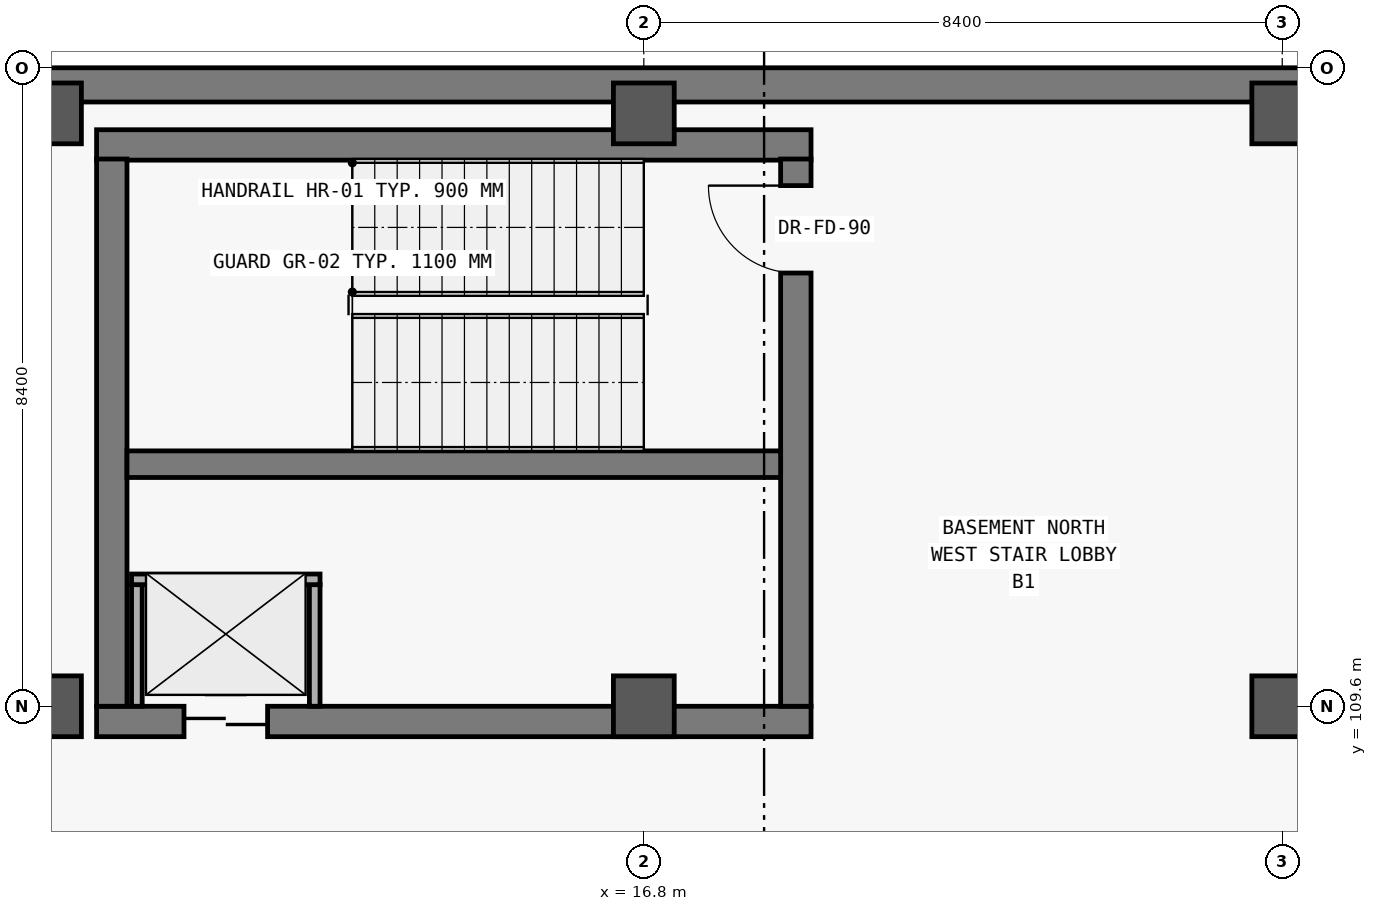
"""IFC4 building model, lengths in metres.
Left out: names, types, materials, properties, quantities, classifications, styles, units other than length and angle.
Written with IfcOpenShell. Run it as: python <this file> out.ifc"""

import sys

from ifc_helpers import new_model, si_unit, direction, frame, frame_2d, origin, origin_2d, place, context, subcontext, project, spatial, rectangle, extrude, element, fill, save


model = new_model("IFC4")
c1 = context("Model", 3, precision=1e-05, world=origin(), true_north=direction((0.0, 1.0)))
c2 = subcontext(c1, "Body", "Model", "MODEL_VIEW")
j1 = project(units=[si_unit("LENGTHUNIT", "METRE"), si_unit("PLANEANGLEUNIT", "RADIAN")], contexts=[c1])
p1 = place(None, origin())
s1 = spatial("IfcSite", under=j1, at=p1, CompositionType="ELEMENT")
p2 = place(p1, origin())
s2 = spatial("IfcBuilding", under=s1, at=p2, CompositionType="ELEMENT")
p3 = place(p2, frame((0.0, 0.0, -4.8)))
s3 = spatial("IfcBuildingStorey", under=s2, at=p3, CompositionType="ELEMENT", Elevation=-4.8)
p4 = place(p3, frame((8.85, 117.775, 0.0), z_axis=(0.0, 0.0, 1.0), x_axis=(1.0, 0.0, 0.0)))
e1 = element("IfcWall", 1, at=p4, inside=s3, PredefinedType="USERDEFINED", context=c2, shape_type="SweptSolid", body=[
    extrude(rectangle(XDim=133.35, YDim=0.45, at=frame_2d((66.675, 0.0))), origin(), (0.0, 0.0, 1.0), 4.48),
])
for number, where, z_axis, x_axis in (
    (2, (9.0, 109.6, 0.0), (0.0, 0.0, 1.0), (1.0, 0.0, 0.0)),
    (3, (9.0, 117.4, 0.0), (0.0, 0.0, 1.0), (1.0, 0.0, 0.0)),
    (4, (16.8, 109.6, 0.0), (0.0, 0.0, 1.0), (1.0, 0.0, 0.0)),
    (5, (16.8, 117.4, 0.0), (0.0, 0.0, 1.0), (1.0, 0.0, 0.0)),
    (6, (25.2, 109.6, 0.0), (0.0, 0.0, 1.0), (1.0, 0.0, 0.0)),
    (7, (25.2, 117.4, 0.0), (0.0, 0.0, 1.0), (1.0, 0.0, 0.0)),
):
    element("IfcColumn", number, at=place(p3, frame(where, z_axis=z_axis, x_axis=x_axis)), inside=s3, PredefinedType="COLUMN", context=c2, shape_type="SweptSolid", body=[
        extrude(rectangle(XDim=0.8, YDim=0.8, at=origin_2d()), origin(), (0.0, 0.0, 1.0), 4.8),
    ])
p5 = place(p3, frame((9.6, 109.4, 0.0), z_axis=(0.0, 0.0, 1.0), x_axis=(1.0, 0.0, 0.0)))
e8 = element("IfcWall", 8, at=p5, inside=s3, PredefinedType="SHEAR", context=c2, shape_type="SweptSolid", body=[
    extrude(rectangle(XDim=9.4, YDim=0.4, at=frame_2d((4.7, 0.0))), origin(), (0.0, 0.0, 1.0), 4.48),
])
p6 = place(p5, frame((1.15, 0.0, 0.0)))
e9 = element("IfcOpeningElement", 9, at=p6, cuts=e8, PredefinedType="OPENING", context=c2, shape_type="SweptSolid", body=[
    extrude(rectangle(XDim=1.1, YDim=2.2, at=frame_2d((0.55, 1.1))), frame((0.0, 0.21, 0.0), z_axis=(0.0, -1.0, 0.0), x_axis=(1.0, 0.0, 0.0)), (0.0, 0.0, 1.0), 0.42),
])
p7 = place(p3, frame((19.0, 116.985, 0.0), z_axis=(0.0, 0.0, 1.0), x_axis=(-1.0, 0.0, 0.0)))
e10 = element("IfcWall", 10, at=p7, inside=s3, PredefinedType="SHEAR", context=c2, shape_type="SweptSolid", body=[
    extrude(rectangle(XDim=9.4, YDim=0.4, at=frame_2d((4.7, 0.0))), origin(), (0.0, 0.0, 1.0), 4.48),
])
p8 = place(p3, frame((9.8, 116.8, 0.0), z_axis=(0.0, 0.0, 1.0), x_axis=(0.0, -1.0, 0.0)))
e11 = element("IfcWall", 11, at=p8, inside=s3, PredefinedType="SHEAR", context=c2, shape_type="SweptSolid", body=[
    extrude(rectangle(XDim=7.2, YDim=0.4, at=frame_2d((3.6, 0.0))), origin(), (0.0, 0.0, 1.0), 4.48),
])
p9 = place(p3, frame((18.8, 109.6, 0.0), z_axis=(0.0, 0.0, 1.0), x_axis=(0.0, 1.0, 0.0)))
e12 = element("IfcWall", 12, at=p9, inside=s3, PredefinedType="SHEAR", context=c2, shape_type="SweptSolid", body=[
    extrude(rectangle(XDim=7.2, YDim=0.4, at=frame_2d((3.6, 0.0))), origin(), (0.0, 0.0, 1.0), 4.48),
])
p10 = place(p9, frame((5.7, 0.0, 0.0)))
e13 = element("IfcOpeningElement", 13, at=p10, cuts=e12, PredefinedType="OPENING", context=c2, shape_type="SweptSolid", body=[
    extrude(rectangle(XDim=1.15, YDim=2.2, at=frame_2d((0.575, 1.1))), frame((0.0, 0.21, 0.0), z_axis=(0.0, -1.0, 0.0), x_axis=(1.0, 0.0, 0.0)), (0.0, 0.0, 1.0), 0.42),
])
p11 = place(p3, frame((10.0, 112.785, 0.0), z_axis=(0.0, 0.0, 1.0), x_axis=(1.0, 0.0, 0.0)))
e14 = element("IfcWall", 14, at=p11, inside=s3, PredefinedType="SHEAR", context=c2, shape_type="SweptSolid", body=[
    extrude(rectangle(XDim=8.6, YDim=0.35, at=frame_2d((4.3, 0.0))), origin(), (0.0, 0.0, 1.0), 4.48),
])
for number, where, z_axis, x_axis in (
    (15, (10.13, 109.6, 0.0), (0.0, 0.0, 1.0), (0.0, 1.0, 0.0)),
    (16, (12.47, 109.6, 0.0), (0.0, 0.0, 1.0), (0.0, 1.0, 0.0)),
):
    element("IfcWall", number, at=place(p3, frame(where, z_axis=z_axis, x_axis=x_axis)), inside=s3, PredefinedType="PARTITIONING", context=c2, shape_type="SweptSolid", body=[
        extrude(rectangle(XDim=1.6, YDim=0.14, at=frame_2d((0.8, 0.0))), origin(), (0.0, 0.0, 1.0), 3.63),
    ])
p12 = place(p3, frame((10.06, 111.27, 0.0), z_axis=(0.0, 0.0, 1.0), x_axis=(1.0, 0.0, 0.0)))
e17 = element("IfcWall", 17, at=p12, inside=s3, PredefinedType="PARTITIONING", context=c2, shape_type="SweptSolid", body=[
    extrude(rectangle(XDim=2.48, YDim=0.14, at=frame_2d((1.24, 0.0))), origin(), (0.0, 0.0, 1.0), 3.63),
])
p13 = place(p10, origin())
e18 = element("IfcDoor", 18, at=p13, inside=s3, OperationType="SINGLE_SWING_RIGHT", PredefinedType="DOOR", context=c2, shape_type="SweptSolid", body=[
    extrude(rectangle(XDim=1.15, YDim=2.2, at=frame_2d((0.575, 1.1))), frame((0.0, 0.025, 0.0), z_axis=(0.0, -1.0, 0.0), x_axis=(1.0, 0.0, 0.0)), (0.0, 0.0, 1.0), 0.05),
])
fill(e13, e18)
p14 = place(p6, origin())
e19 = element("IfcDoor", 19, at=p14, inside=s3, OperationType="DOUBLE_DOOR_SLIDING", PredefinedType="DOOR", context=c2, shape_type="SweptSolid", body=[
    extrude(rectangle(XDim=1.1, YDim=2.2, at=frame_2d((0.55, 1.1))), frame((0.0, 0.025, 0.0), z_axis=(0.0, -1.0, 0.0), x_axis=(1.0, 0.0, 0.0)), (0.0, 0.0, 1.0), 0.05),
])
fill(e9, e19)
save(model, sys.argv[1])
